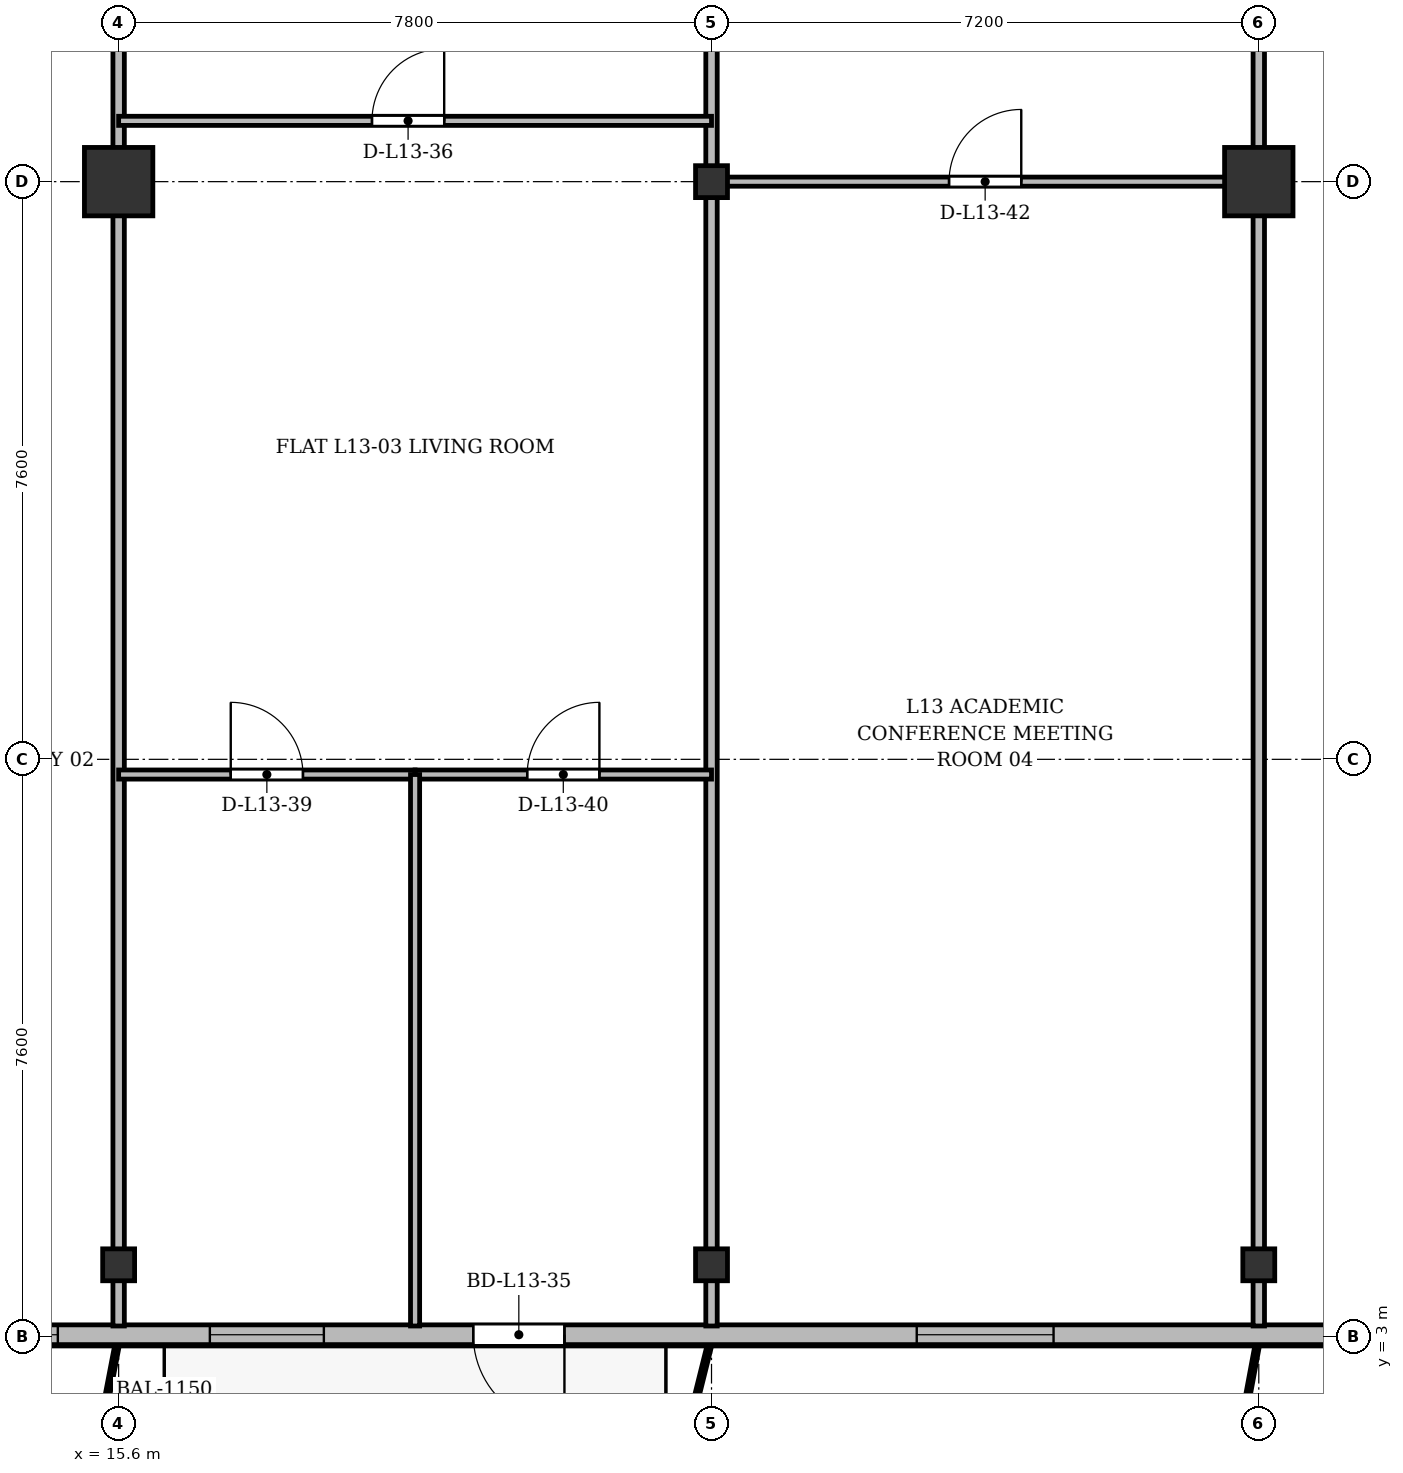
"""IFC4 building model, lengths in metres.
Left out: names, types, materials, properties, quantities, classifications, styles, units other than length and angle.
Written with IfcOpenShell. Run it as: python <this file> out.ifc"""

import sys

from ifc_helpers import new_model, si_unit, direction, frame, frame_2d, origin, origin_2d, place, context, subcontext, project, spatial, rectangle, i_section, extrude, source, transform, mapped, element, fill, save


model = new_model("IFC4")
c1 = context("Model", 3, precision=1e-05, world=origin(), true_north=direction((0.0, 1.0)))
c2 = subcontext(c1, "Body", "Model", "MODEL_VIEW")
j1 = project(units=[si_unit("LENGTHUNIT", "METRE"), si_unit("PLANEANGLEUNIT", "RADIAN")], contexts=[c1])
p1 = place(None, origin())
s1 = spatial("IfcSite", under=j1, at=p1, CompositionType="ELEMENT")
p2 = place(p1, origin())
s2 = spatial("IfcBuilding", under=s1, at=p2, CompositionType="ELEMENT")
p3 = place(p2, frame((0.0, 0.0, 52.3)))
s3 = spatial("IfcBuildingStorey", under=s2, at=p3, CompositionType="ELEMENT", Elevation=52.3)
m1 = source(origin(), c2, "Body", "SweptSolid", [
    extrude(i_section(OverallWidth=0.42, OverallDepth=0.42, WebThickness=0.026, FlangeThickness=0.04, at=origin_2d()), origin(), (0.0, 0.0, 1.0), 3.6),
])
p4 = place(p3, frame((15.6, 3.95, 0.0), z_axis=(0.0, 0.0, 1.0), x_axis=(1.0, 0.0, 0.0)))
e1 = element("IfcColumn", 1, at=p4, inside=s3, PredefinedType="COLUMN", context=c2, shape_type="MappedRepresentation", body=[
    mapped(m1, transform((0.0, 0.0, 0.0), x_axis=(1.0, 0.0, 0.0), y_axis=(0.0, 1.0, 0.0), z_axis=(0.0, 0.0, 1.0), scale=1.0)),
])
m2 = source(origin(), c2, "Body", "SweptSolid", [
    extrude(rectangle(XDim=0.9, YDim=0.9, at=origin_2d()), origin(), (0.0, 0.0, 1.0), 3.6),
])
p5 = place(p3, frame((15.6, 18.2, 0.0), z_axis=(0.0, 0.0, 1.0), x_axis=(1.0, 0.0, 0.0)))
e2 = element("IfcColumn", 2, at=p5, inside=s3, PredefinedType="COLUMN", context=c2, shape_type="MappedRepresentation", body=[
    mapped(m2, transform((0.0, 0.0, 0.0), x_axis=(1.0, 0.0, 0.0), y_axis=(0.0, 1.0, 0.0), z_axis=(0.0, 0.0, 1.0), scale=1.0)),
])
for number, where, z_axis, x_axis in (
    (3, (23.4, 3.95, 0.0), (0.0, 0.0, 1.0), (1.0, 0.0, 0.0)),
    (4, (23.4, 18.2, 0.0), (0.0, 0.0, 1.0), (1.0, 0.0, 0.0)),
    (5, (30.6, 3.95, 0.0), (0.0, 0.0, 1.0), (1.0, 0.0, 0.0)),
):
    element("IfcColumn", number, at=place(p3, frame(where, z_axis=z_axis, x_axis=x_axis)), inside=s3, PredefinedType="COLUMN", context=c2, shape_type="MappedRepresentation", body=[
        mapped(m1, transform((0.0, 0.0, 0.0), x_axis=(1.0, 0.0, 0.0), y_axis=(0.0, 1.0, 0.0), z_axis=(0.0, 0.0, 1.0), scale=1.0)),
    ])
p6 = place(p3, frame((30.6, 18.2, 0.0), z_axis=(0.0, 0.0, 1.0), x_axis=(1.0, 0.0, 0.0)))
e6 = element("IfcColumn", 6, at=p6, inside=s3, PredefinedType="COLUMN", context=c2, shape_type="MappedRepresentation", body=[
    mapped(m2, transform((0.0, 0.0, 0.0), x_axis=(1.0, 0.0, 0.0), y_axis=(0.0, 1.0, 0.0), z_axis=(0.0, 0.0, 1.0), scale=1.0)),
])
p7 = place(p3, frame((66.9, 3.03, 0.0), z_axis=(0.0, 0.0, 1.0), x_axis=(-1.0, 0.0, 0.0)))
e7 = element("IfcWall", 7, at=p7, inside=s3, PredefinedType="SOLIDWALL", context=c2, shape_type="SweptSolid", body=[
    extrude(rectangle(XDim=59.4, YDim=0.26, at=frame_2d((29.7, 0.0))), origin(), (0.0, 0.0, 1.0), 3.34),
])
p8 = place(p7, frame((0.495, 0.0, 0.9)))
e8 = element("IfcOpeningElement", 8, at=p8, cuts=e7, PredefinedType="OPENING", context=c2, shape_type="SweptSolid", body=[
    extrude(rectangle(XDim=2.0, YDim=1.95, at=frame_2d((1.0, 0.975))), frame((0.0, 0.14, 0.0), z_axis=(0.0, -1.0, 0.0), x_axis=(1.0, 0.0, 0.0)), (0.0, 0.0, 1.0), 0.28),
])
p9 = place(p7, frame((4.675, 0.0, 0.9)))
e9 = element("IfcOpeningElement", 9, at=p9, cuts=e7, PredefinedType="OPENING", context=c2, shape_type="SweptSolid", body=[
    extrude(rectangle(XDim=1.65, YDim=1.85, at=frame_2d((0.825, 0.925))), frame((0.0, 0.14, 0.0), z_axis=(0.0, -1.0, 0.0), x_axis=(1.0, 0.0, 0.0)), (0.0, 0.0, 1.0), 0.28),
])
p10 = place(p7, frame((11.1, 0.0, 0.9)))
e10 = element("IfcOpeningElement", 10, at=p10, cuts=e7, PredefinedType="OPENING", context=c2, shape_type="SweptSolid", body=[
    extrude(rectangle(XDim=1.8, YDim=1.8, at=frame_2d((0.9, 0.9))), frame((0.0, 0.14, 0.0), z_axis=(0.0, -1.0, 0.0), x_axis=(1.0, 0.0, 0.0)), (0.0, 0.0, 1.0), 0.28),
])
p11 = place(p7, frame((17.007, 0.0, 0.0)))
e11 = element("IfcOpeningElement", 11, at=p11, cuts=e7, PredefinedType="OPENING", context=c2, shape_type="SweptSolid", body=[
    extrude(rectangle(XDim=1.2, YDim=2.2, at=frame_2d((0.6, 1.1))), frame((0.0, 0.14, 0.0), z_axis=(0.0, -1.0, 0.0), x_axis=(1.0, 0.0, 0.0)), (0.0, 0.0, 1.0), 0.28),
])
p12 = place(p7, frame((20.55, 0.0, 0.9)))
e12 = element("IfcOpeningElement", 12, at=p12, cuts=e7, PredefinedType="OPENING", context=c2, shape_type="SweptSolid", body=[
    extrude(rectangle(XDim=1.5, YDim=1.75, at=frame_2d((0.75, 0.875))), frame((0.0, 0.14, 0.0), z_axis=(0.0, -1.0, 0.0), x_axis=(1.0, 0.0, 0.0)), (0.0, 0.0, 1.0), 0.28),
])
p13 = place(p7, frame((24.5, 0.0, 0.9)))
e13 = element("IfcOpeningElement", 13, at=p13, cuts=e7, PredefinedType="OPENING", context=c2, shape_type="SweptSolid", body=[
    extrude(rectangle(XDim=2.0, YDim=1.95, at=frame_2d((1.0, 0.975))), frame((0.0, 0.14, 0.0), z_axis=(0.0, -1.0, 0.0), x_axis=(1.0, 0.0, 0.0)), (0.0, 0.0, 1.0), 0.28),
])
p14 = place(p7, frame((31.275, 0.0, 0.9)))
e14 = element("IfcOpeningElement", 14, at=p14, cuts=e7, PredefinedType="OPENING", context=c2, shape_type="SweptSolid", body=[
    extrude(rectangle(XDim=1.65, YDim=1.85, at=frame_2d((0.825, 0.925))), frame((0.0, 0.14, 0.0), z_axis=(0.0, -1.0, 0.0), x_axis=(1.0, 0.0, 0.0)), (0.0, 0.0, 1.0), 0.28),
])
p15 = place(p7, frame((39.0, 0.0, 0.9)))
e15 = element("IfcOpeningElement", 15, at=p15, cuts=e7, PredefinedType="OPENING", context=c2, shape_type="SweptSolid", body=[
    extrude(rectangle(XDim=1.8, YDim=1.8, at=frame_2d((0.9, 0.9))), frame((0.0, 0.14, 0.0), z_axis=(0.0, -1.0, 0.0), x_axis=(1.0, 0.0, 0.0)), (0.0, 0.0, 1.0), 0.28),
])
p16 = place(p7, frame((45.435, 0.0, 0.0)))
e16 = element("IfcOpeningElement", 16, at=p16, cuts=e7, PredefinedType="OPENING", context=c2, shape_type="SweptSolid", body=[
    extrude(rectangle(XDim=1.2, YDim=2.2, at=frame_2d((0.6, 1.1))), frame((0.0, 0.14, 0.0), z_axis=(0.0, -1.0, 0.0), x_axis=(1.0, 0.0, 0.0)), (0.0, 0.0, 1.0), 0.28),
])
p17 = place(p7, frame((48.6, 0.0, 0.9)))
e17 = element("IfcOpeningElement", 17, at=p17, cuts=e7, PredefinedType="OPENING", context=c2, shape_type="SweptSolid", body=[
    extrude(rectangle(XDim=1.5, YDim=1.75, at=frame_2d((0.75, 0.875))), frame((0.0, 0.14, 0.0), z_axis=(0.0, -1.0, 0.0), x_axis=(1.0, 0.0, 0.0)), (0.0, 0.0, 1.0), 0.28),
])
p18 = place(p7, frame((52.1, 0.0, 0.9)))
e18 = element("IfcOpeningElement", 18, at=p18, cuts=e7, PredefinedType="OPENING", context=c2, shape_type="SweptSolid", body=[
    extrude(rectangle(XDim=2.0, YDim=1.95, at=frame_2d((1.0, 0.975))), frame((0.0, 0.14, 0.0), z_axis=(0.0, -1.0, 0.0), x_axis=(1.0, 0.0, 0.0)), (0.0, 0.0, 1.0), 0.28),
])
p19 = place(p7, frame((56.28, 0.0, 0.9)))
e19 = element("IfcOpeningElement", 19, at=p19, cuts=e7, PredefinedType="OPENING", context=c2, shape_type="SweptSolid", body=[
    extrude(rectangle(XDim=1.65, YDim=1.85, at=frame_2d((0.825, 0.925))), frame((0.0, 0.14, 0.0), z_axis=(0.0, -1.0, 0.0), x_axis=(1.0, 0.0, 0.0)), (0.0, 0.0, 1.0), 0.28),
])
for number, where, z_axis, x_axis in (
    (20, (15.6, 3.145, 0.0), (0.0, 0.0, 1.0), (0.0, 1.0, 0.0)),
    (21, (23.4, 3.145, 0.0), (0.0, 0.0, 1.0), (0.0, 1.0, 0.0)),
    (22, (30.6, 3.145, 0.0), (0.0, 0.0, 1.0), (0.0, 1.0, 0.0)),
):
    element("IfcWall", number, at=place(p3, frame(where, z_axis=z_axis, x_axis=x_axis)), inside=s3, PredefinedType="PARTITIONING", context=c2, shape_type="SweptSolid", body=[
        extrude(rectangle(XDim=24.455, YDim=0.15, at=frame_2d((12.228, 0.0))), origin(), (0.0, 0.0, 1.0), 2.752),
    ])
p20 = place(p3, frame((15.6, 19.0, 0.0), z_axis=(0.0, 0.0, 1.0), x_axis=(1.0, 0.0, 0.0)))
e23 = element("IfcWall", 23, at=p20, inside=s3, PredefinedType="PARTITIONING", context=c2, shape_type="SweptSolid", body=[
    extrude(rectangle(XDim=7.8, YDim=0.12, at=frame_2d((3.9, 0.0))), origin(), (0.0, 0.0, 1.0), 2.752),
])
p21 = place(p20, frame((3.333, 0.0, 0.0)))
e24 = element("IfcOpeningElement", 24, at=p21, cuts=e23, PredefinedType="OPENING", context=c2, shape_type="SweptSolid", body=[
    extrude(rectangle(XDim=0.95, YDim=2.15, at=frame_2d((0.475, 1.075))), frame((0.0, 0.07, 0.0), z_axis=(0.0, -1.0, 0.0), x_axis=(1.0, 0.0, 0.0)), (0.0, 0.0, 1.0), 0.14),
])
p22 = place(p3, frame((15.6, 10.4, 0.0), z_axis=(0.0, 0.0, 1.0), x_axis=(1.0, 0.0, 0.0)))
e25 = element("IfcWall", 25, at=p22, inside=s3, PredefinedType="PARTITIONING", context=c2, shape_type="SweptSolid", body=[
    extrude(rectangle(XDim=3.9, YDim=0.12, at=frame_2d((1.95, 0.0))), origin(), (0.0, 0.0, 1.0), 2.752),
])
p23 = place(p22, frame((1.475, 0.0, 0.0)))
e26 = element("IfcOpeningElement", 26, at=p23, cuts=e25, PredefinedType="OPENING", context=c2, shape_type="SweptSolid", body=[
    extrude(rectangle(XDim=0.95, YDim=2.15, at=frame_2d((0.475, 1.075))), frame((0.0, 0.07, 0.0), z_axis=(0.0, -1.0, 0.0), x_axis=(1.0, 0.0, 0.0)), (0.0, 0.0, 1.0), 0.14),
])
p24 = place(p3, frame((19.5, 10.4, 0.0), z_axis=(0.0, 0.0, 1.0), x_axis=(1.0, 0.0, 0.0)))
e27 = element("IfcWall", 27, at=p24, inside=s3, PredefinedType="PARTITIONING", context=c2, shape_type="SweptSolid", body=[
    extrude(rectangle(XDim=3.9, YDim=0.12, at=frame_2d((1.95, 0.0))), origin(), (0.0, 0.0, 1.0), 2.752),
])
p25 = place(p24, frame((1.475, 0.0, 0.0)))
e28 = element("IfcOpeningElement", 28, at=p25, cuts=e27, PredefinedType="OPENING", context=c2, shape_type="SweptSolid", body=[
    extrude(rectangle(XDim=0.95, YDim=2.15, at=frame_2d((0.475, 1.075))), frame((0.0, 0.07, 0.0), z_axis=(0.0, -1.0, 0.0), x_axis=(1.0, 0.0, 0.0)), (0.0, 0.0, 1.0), 0.14),
])
p26 = place(p3, frame((19.5, 3.145, 0.0), z_axis=(0.0, 0.0, 1.0), x_axis=(0.0, 1.0, 0.0)))
e29 = element("IfcWall", 29, at=p26, inside=s3, PredefinedType="PARTITIONING", context=c2, shape_type="SweptSolid", body=[
    extrude(rectangle(XDim=7.255, YDim=0.12, at=frame_2d((3.627, 0.0))), origin(), (0.0, 0.0, 1.0), 2.69),
])
p27 = place(p3, frame((23.4, 18.2, 0.0), z_axis=(0.0, 0.0, 1.0), x_axis=(1.0, 0.0, 0.0)))
e30 = element("IfcWall", 30, at=p27, inside=s3, PredefinedType="PARTITIONING", context=c2, shape_type="SweptSolid", body=[
    extrude(rectangle(XDim=7.2, YDim=0.12, at=frame_2d((3.6, 0.0))), origin(), (0.0, 0.0, 1.0), 2.69),
])
p28 = place(p27, frame((3.125, 0.0, 0.0)))
e31 = element("IfcOpeningElement", 31, at=p28, cuts=e30, PredefinedType="OPENING", context=c2, shape_type="SweptSolid", body=[
    extrude(rectangle(XDim=0.95, YDim=2.15, at=frame_2d((0.475, 1.075))), frame((0.0, 0.07, 0.0), z_axis=(0.0, -1.0, 0.0), x_axis=(1.0, 0.0, 0.0)), (0.0, 0.0, 1.0), 0.14),
])
m3 = source(origin(), c2, "Body", "SweptSolid", [
    extrude(rectangle(XDim=1.8, YDim=1.8, at=frame_2d((0.9, 0.9))), frame((0.0, 0.03, 0.0), z_axis=(0.0, -1.0, 0.0), x_axis=(1.0, 0.0, 0.0)), (0.0, 0.0, 1.0), 0.06),
])
p29 = place(p15, origin())
e32 = element("IfcWindow", 32, at=p29, inside=s3, PartitioningType="SINGLE_PANEL", PredefinedType="WINDOW", context=c2, shape_type="MappedRepresentation", body=[
    mapped(m3, transform((0.0, 0.0, 0.0), x_axis=(1.0, 0.0, 0.0), y_axis=(0.0, 1.0, 0.0), z_axis=(0.0, 0.0, 1.0), scale=1.0)),
])
fill(e15, e32)
m4 = source(origin(), c2, "Body", "SweptSolid", [
    extrude(rectangle(XDim=1.2, YDim=2.2, at=frame_2d((0.6, 1.1))), frame((0.0, 0.025, 0.0), z_axis=(0.0, -1.0, 0.0), x_axis=(1.0, 0.0, 0.0)), (0.0, 0.0, 1.0), 0.05),
])
p30 = place(p16, origin())
e33 = element("IfcDoor", 33, at=p30, inside=s3, OperationType="SINGLE_SWING_LEFT", PredefinedType="DOOR", context=c2, shape_type="MappedRepresentation", body=[
    mapped(m4, transform((0.0, 0.0, 0.0), x_axis=(1.0, 0.0, 0.0), y_axis=(0.0, 1.0, 0.0), z_axis=(0.0, 0.0, 1.0), scale=1.0)),
])
fill(e16, e33)
m5 = source(origin(), c2, "Body", "SweptSolid", [
    extrude(rectangle(XDim=1.5, YDim=1.75, at=frame_2d((0.75, 0.875))), frame((0.0, 0.03, 0.0), z_axis=(0.0, -1.0, 0.0), x_axis=(1.0, 0.0, 0.0)), (0.0, 0.0, 1.0), 0.06),
])
p31 = place(p17, origin())
e34 = element("IfcWindow", 34, at=p31, inside=s3, PartitioningType="SINGLE_PANEL", PredefinedType="WINDOW", context=c2, shape_type="MappedRepresentation", body=[
    mapped(m5, transform((0.0, 0.0, 0.0), x_axis=(1.0, 0.0, 0.0), y_axis=(0.0, 1.0, 0.0), z_axis=(0.0, 0.0, 1.0), scale=1.0)),
])
fill(e17, e34)
m6 = source(origin(), c2, "Body", "SweptSolid", [
    extrude(rectangle(XDim=2.0, YDim=1.95, at=frame_2d((1.0, 0.975))), frame((0.0, 0.03, 0.0), z_axis=(0.0, -1.0, 0.0), x_axis=(1.0, 0.0, 0.0)), (0.0, 0.0, 1.0), 0.06),
])
p32 = place(p18, origin())
e35 = element("IfcWindow", 35, at=p32, inside=s3, PartitioningType="SINGLE_PANEL", PredefinedType="WINDOW", context=c2, shape_type="MappedRepresentation", body=[
    mapped(m6, transform((0.0, 0.0, 0.0), x_axis=(1.0, 0.0, 0.0), y_axis=(0.0, 1.0, 0.0), z_axis=(0.0, 0.0, 1.0), scale=1.0)),
])
fill(e18, e35)
m7 = source(origin(), c2, "Body", "SweptSolid", [
    extrude(rectangle(XDim=0.95, YDim=2.15, at=frame_2d((0.475, 1.075))), frame((0.0, 0.025, 0.0), z_axis=(0.0, -1.0, 0.0), x_axis=(1.0, 0.0, 0.0)), (0.0, 0.0, 1.0), 0.05),
])
p33 = place(p21, origin())
e36 = element("IfcDoor", 36, at=p33, inside=s3, OperationType="SINGLE_SWING_RIGHT", PredefinedType="DOOR", context=c2, shape_type="MappedRepresentation", body=[
    mapped(m7, transform((0.0, 0.0, 0.0), x_axis=(1.0, 0.0, 0.0), y_axis=(0.0, 1.0, 0.0), z_axis=(0.0, 0.0, 1.0), scale=1.0)),
])
fill(e24, e36)
p34 = place(p23, origin())
e37 = element("IfcDoor", 37, at=p34, inside=s3, OperationType="SINGLE_SWING_LEFT", PredefinedType="DOOR", context=c2, shape_type="MappedRepresentation", body=[
    mapped(m7, transform((0.0, 0.0, 0.0), x_axis=(1.0, 0.0, 0.0), y_axis=(0.0, 1.0, 0.0), z_axis=(0.0, 0.0, 1.0), scale=1.0)),
])
fill(e26, e37)
p35 = place(p25, origin())
e38 = element("IfcDoor", 38, at=p35, inside=s3, OperationType="SINGLE_SWING_RIGHT", PredefinedType="DOOR", context=c2, shape_type="MappedRepresentation", body=[
    mapped(m7, transform((0.0, 0.0, 0.0), x_axis=(1.0, 0.0, 0.0), y_axis=(0.0, 1.0, 0.0), z_axis=(0.0, 0.0, 1.0), scale=1.0)),
])
fill(e28, e38)
p36 = place(p28, origin())
e39 = element("IfcDoor", 39, at=p36, inside=s3, OperationType="SINGLE_SWING_RIGHT", PredefinedType="DOOR", context=c2, shape_type="MappedRepresentation", body=[
    mapped(m7, transform((0.0, 0.0, 0.0), x_axis=(1.0, 0.0, 0.0), y_axis=(0.0, 1.0, 0.0), z_axis=(0.0, 0.0, 1.0), scale=1.0)),
])
fill(e31, e39)
save(model, sys.argv[1])
